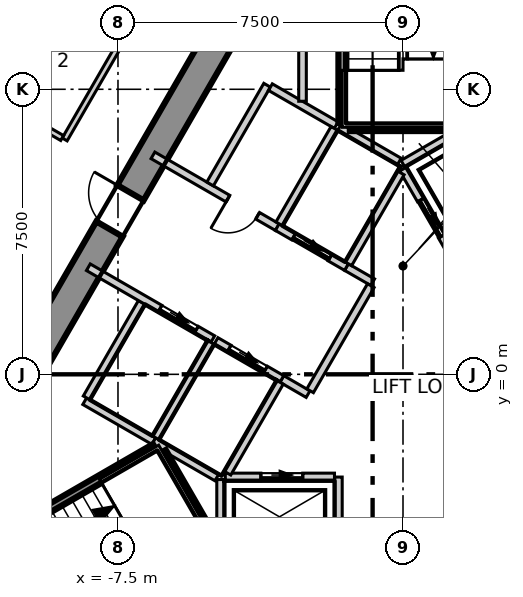
"""IFC4 building model, lengths in metres.
Left out: names, types, materials, properties, quantities, classifications, styles, units other than length and angle.
Written with IfcOpenShell. Run it as: python <this file> out.ifc"""

import sys

from ifc_helpers import new_model, si_unit, direction, frame, frame_2d, origin, place, context, subcontext, project, spatial, polyline, rectangle, outline, extrude, element, fill, save


model = new_model("IFC4")
c1 = context("Model", 3, precision=1e-05, world=origin(), true_north=direction((0.0, 1.0)))
c2 = subcontext(c1, "Body", "Model", "MODEL_VIEW")
j1 = project(units=[si_unit("LENGTHUNIT", "METRE"), si_unit("PLANEANGLEUNIT", "RADIAN")], contexts=[c1])
p1 = place(None, origin())
s1 = spatial("IfcSite", under=j1, at=p1, CompositionType="ELEMENT")
p2 = place(p1, origin())
s2 = spatial("IfcBuilding", under=s1, at=p2, CompositionType="ELEMENT")
p3 = place(p2, frame((0.0, 0.0, 128.3)))
s3 = spatial("IfcBuildingStorey", under=s2, at=p3, CompositionType="ELEMENT", Elevation=128.3)
p4 = place(p3, frame((-1.674, 14.3, -0.3), z_axis=(0.0, 0.0, 1.0), x_axis=(-0.499995765644, -0.866027848477, 0.0)))
e1 = element("IfcWall", 1, at=p4, inside=s3, PredefinedType="SHEAR", context=c2, shape_type="SweptSolid", body=[
    extrude(outline(polyline([(-0.231, -0.4), (1.732, -0.4), (3.695, -0.4), (5.658, -0.4), (7.621, -0.4), (9.584, -0.4), (11.547, -0.4), (13.51, -0.4), (15.473, -0.4), (17.436, -0.4), (19.399, -0.4), (21.362, -0.4), (23.325, -0.4), (22.863, 0.4), (20.977, 0.4), (19.091, 0.4), (17.205, 0.4), (15.319, 0.4), (13.433, 0.4), (11.547, 0.4), (9.661, 0.4), (7.775, 0.4), (5.889, 0.4), (4.003, 0.4), (2.117, 0.4), (0.231, 0.4), (-0.231, -0.4)])), origin(), (0.0, 0.0, 1.0), 4.0),
])
p5 = place(p4, frame((10.997, 0.0, 0.3)))
e2 = element("IfcOpeningElement", 2, at=p5, cuts=e1, PredefinedType="OPENING", context=c2, shape_type="SweptSolid", body=[
    extrude(rectangle(XDim=1.1, YDim=2.1, at=frame_2d((0.55, 1.05))), frame((0.0, 0.41, 0.0), z_axis=(0.0, -1.0, 0.0), x_axis=(1.0, 0.0, 0.0)), (0.0, 0.0, 1.0), 0.82),
])
p6 = place(p4, frame((5.444, 0.0, 0.3)))
e3 = element("IfcOpeningElement", 3, at=p6, cuts=e1, PredefinedType="OPENING", context=c2, shape_type="SweptSolid", body=[
    extrude(rectangle(XDim=0.9, YDim=2.1, at=frame_2d((0.45, 1.05))), frame((0.0, 0.41, 0.0), z_axis=(0.0, -1.0, 0.0), x_axis=(1.0, 0.0, 0.0)), (0.0, 0.0, 1.0), 0.82),
])
p7 = place(p3, frame((-3.109, 34.679, 0.0), z_axis=(0.0, 0.0, 1.0), x_axis=(-0.50000689325, -0.866021423928, 0.0)))
e4 = element("IfcWall", 4, at=p7, inside=s3, PredefinedType="ELEMENTEDWALL", context=c2, shape_type="SweptSolid", body=[
    extrude(rectangle(XDim=56.937, YDim=0.2, at=frame_2d((28.469, 0.0))), origin(), (0.0, 0.0, 1.0), 3.7),
])
p8 = place(p7, frame((2.249, 0.0, 0.9)))
e5 = element("IfcOpeningElement", 5, at=p8, cuts=e4, PredefinedType="OPENING", context=c2, shape_type="SweptSolid", body=[
    extrude(rectangle(XDim=4.9, YDim=2.5, at=frame_2d((2.45, 1.25))), frame((0.0, 0.11, 0.0), z_axis=(0.0, -1.0, 0.0), x_axis=(1.0, 0.0, 0.0)), (0.0, 0.0, 1.0), 0.22),
])
p9 = place(p7, frame((9.043, 0.0, 0.9)))
e6 = element("IfcOpeningElement", 6, at=p9, cuts=e4, PredefinedType="OPENING", context=c2, shape_type="SweptSolid", body=[
    extrude(rectangle(XDim=4.9, YDim=2.5, at=frame_2d((2.45, 1.25))), frame((0.0, 0.11, 0.0), z_axis=(0.0, -1.0, 0.0), x_axis=(1.0, 0.0, 0.0)), (0.0, 0.0, 1.0), 0.22),
])
p10 = place(p7, frame((15.837, 0.0, 0.9)))
e7 = element("IfcOpeningElement", 7, at=p10, cuts=e4, PredefinedType="OPENING", context=c2, shape_type="SweptSolid", body=[
    extrude(rectangle(XDim=4.9, YDim=2.5, at=frame_2d((2.45, 1.25))), frame((0.0, 0.11, 0.0), z_axis=(0.0, -1.0, 0.0), x_axis=(1.0, 0.0, 0.0)), (0.0, 0.0, 1.0), 0.22),
])
p11 = place(p7, frame((22.631, 0.0, 0.9)))
e8 = element("IfcOpeningElement", 8, at=p11, cuts=e4, PredefinedType="OPENING", context=c2, shape_type="SweptSolid", body=[
    extrude(rectangle(XDim=4.9, YDim=2.5, at=frame_2d((2.45, 1.25))), frame((0.0, 0.11, 0.0), z_axis=(0.0, -1.0, 0.0), x_axis=(1.0, 0.0, 0.0)), (0.0, 0.0, 1.0), 0.22),
])
p12 = place(p7, frame((29.425, 0.0, 0.9)))
e9 = element("IfcOpeningElement", 9, at=p12, cuts=e4, PredefinedType="OPENING", context=c2, shape_type="SweptSolid", body=[
    extrude(rectangle(XDim=4.9, YDim=2.5, at=frame_2d((2.45, 1.25))), frame((0.0, 0.11, 0.0), z_axis=(0.0, -1.0, 0.0), x_axis=(1.0, 0.0, 0.0)), (0.0, 0.0, 1.0), 0.22),
])
p13 = place(p7, frame((36.219, 0.0, 0.9)))
e10 = element("IfcOpeningElement", 10, at=p13, cuts=e4, PredefinedType="OPENING", context=c2, shape_type="SweptSolid", body=[
    extrude(rectangle(XDim=4.9, YDim=2.5, at=frame_2d((2.45, 1.25))), frame((0.0, 0.11, 0.0), z_axis=(0.0, -1.0, 0.0), x_axis=(1.0, 0.0, 0.0)), (0.0, 0.0, 1.0), 0.22),
])
p14 = place(p7, frame((43.013, 0.0, 0.9)))
e11 = element("IfcOpeningElement", 11, at=p14, cuts=e4, PredefinedType="OPENING", context=c2, shape_type="SweptSolid", body=[
    extrude(rectangle(XDim=4.9, YDim=2.5, at=frame_2d((2.45, 1.25))), frame((0.0, 0.11, 0.0), z_axis=(0.0, -1.0, 0.0), x_axis=(1.0, 0.0, 0.0)), (0.0, 0.0, 1.0), 0.22),
])
p15 = place(p7, frame((49.807, 0.0, 0.9)))
e12 = element("IfcOpeningElement", 12, at=p15, cuts=e4, PredefinedType="OPENING", context=c2, shape_type="SweptSolid", body=[
    extrude(rectangle(XDim=4.9, YDim=2.5, at=frame_2d((2.45, 1.25))), frame((0.0, 0.11, 0.0), z_axis=(0.0, -1.0, 0.0), x_axis=(1.0, 0.0, 0.0)), (0.0, 0.0, 1.0), 0.22),
])
p16 = place(p3, frame((-8.903, 6.18, 0.0), z_axis=(0.0, 0.0, 1.0), x_axis=(0.500010074151, 0.866019587393, 0.0)))
e13 = element("IfcWall", 13, at=p16, inside=s3, PredefinedType="PARTITIONING", context=c2, shape_type="SweptSolid", body=[
    extrude(rectangle(XDim=17.806, YDim=0.15, at=frame_2d((8.903, 0.0))), origin(), (0.0, 0.0, 1.0), 3.7),
])
p17 = place(p16, frame((14.756, 0.0, 0.0)))
e14 = element("IfcOpeningElement", 14, at=p17, cuts=e13, PredefinedType="OPENING", context=c2, shape_type="SweptSolid", body=[
    extrude(rectangle(XDim=1.0, YDim=2.1, at=frame_2d((0.5, 1.05))), frame((0.0, 0.085, 0.0), z_axis=(0.0, -1.0, 0.0), x_axis=(1.0, 0.0, 0.0)), (0.0, 0.0, 1.0), 0.17),
])
p18 = place(p16, frame((2.838, 0.0, 0.0)))
e15 = element("IfcOpeningElement", 15, at=p18, cuts=e13, PredefinedType="OPENING", context=c2, shape_type="SweptSolid", body=[
    extrude(rectangle(XDim=1.1, YDim=2.1, at=frame_2d((0.55, 1.05))), frame((0.0, 0.085, 0.0), z_axis=(0.0, -1.0, 0.0), x_axis=(1.0, 0.0, 0.0)), (0.0, 0.0, 1.0), 0.17),
])
p19 = place(p16, frame((10.438, 0.0, 0.0)))
e16 = element("IfcOpeningElement", 16, at=p19, cuts=e13, PredefinedType="OPENING", context=c2, shape_type="SweptSolid", body=[
    extrude(rectangle(XDim=0.9, YDim=2.1, at=frame_2d((0.45, 1.05))), frame((0.0, 0.085, 0.0), z_axis=(0.0, -1.0, 0.0), x_axis=(1.0, 0.0, 0.0)), (0.0, 0.0, 1.0), 0.17),
])
p20 = place(p16, frame((7.438, 0.0, 0.0)))
e17 = element("IfcOpeningElement", 17, at=p20, cuts=e13, PredefinedType="OPENING", context=c2, shape_type="SweptSolid", body=[
    extrude(rectangle(XDim=0.9, YDim=2.1, at=frame_2d((0.45, 1.05))), frame((0.0, 0.085, 0.0), z_axis=(0.0, -1.0, 0.0), x_axis=(1.0, 0.0, 0.0)), (0.0, 0.0, 1.0), 0.17),
])
p21 = place(p3, frame((-12.475, 8.242, 0.0), z_axis=(0.0, 0.0, 1.0), x_axis=(0.865955608197, -0.500120870022, 0.0)))
e18 = element("IfcWall", 18, at=p21, inside=s3, PredefinedType="PARTITIONING", context=c2, shape_type="SweptSolid", body=[
    extrude(rectangle(XDim=4.049, YDim=0.15, at=frame_2d((2.024, 0.0))), origin(), (0.0, 0.0, 1.0), 3.7),
])
p22 = place(p3, frame((0.076, 21.468, 0.0), z_axis=(0.0, 0.0, 1.0), x_axis=(0.50001203818, -0.866018453426, 0.0)))
e19 = element("IfcWall", 19, at=p22, inside=s3, PredefinedType="PARTITIONING", context=c2, shape_type="SweptSolid", body=[
    extrude(rectangle(XDim=24.448, YDim=0.15, at=frame_2d((12.224, 0.0))), origin(), (0.0, 0.0, 1.0), 3.7),
])
p23 = place(p22, frame((9.798, 0.0, 0.0)))
e20 = element("IfcOpeningElement", 20, at=p23, cuts=e19, PredefinedType="OPENING", context=c2, shape_type="SweptSolid", body=[
    extrude(rectangle(XDim=1.1, YDim=2.1, at=frame_2d((0.55, 1.05))), frame((0.0, 0.085, 0.0), z_axis=(0.0, -1.0, 0.0), x_axis=(1.0, 0.0, 0.0)), (0.0, 0.0, 1.0), 0.17),
])
p24 = place(p22, frame((19.198, 0.0, 0.0)))
e21 = element("IfcOpeningElement", 21, at=p24, cuts=e19, PredefinedType="OPENING", context=c2, shape_type="SweptSolid", body=[
    extrude(rectangle(XDim=0.9, YDim=2.1, at=frame_2d((0.45, 1.05))), frame((0.0, 0.085, 0.0), z_axis=(0.0, -1.0, 0.0), x_axis=(1.0, 0.0, 0.0)), (0.0, 0.0, 1.0), 0.17),
])
p25 = place(p22, frame((16.398, 0.0, 0.0)))
e22 = element("IfcOpeningElement", 22, at=p25, cuts=e19, PredefinedType="OPENING", context=c2, shape_type="SweptSolid", body=[
    extrude(rectangle(XDim=1.0, YDim=2.1, at=frame_2d((0.5, 1.05))), frame((0.0, 0.085, 0.0), z_axis=(0.0, -1.0, 0.0), x_axis=(1.0, 0.0, 0.0)), (0.0, 0.0, 1.0), 0.17),
])
p26 = place(p22, frame((1.815, 0.0, 0.0)))
e23 = element("IfcOpeningElement", 23, at=p26, cuts=e19, PredefinedType="OPENING", context=c2, shape_type="SweptSolid", body=[
    extrude(rectangle(XDim=1.1, YDim=2.1, at=frame_2d((0.55, 1.05))), frame((0.0, 0.085, 0.0), z_axis=(0.0, -1.0, 0.0), x_axis=(1.0, 0.0, 0.0)), (0.0, 0.0, 1.0), 0.17),
])
p27 = place(p3, frame((-8.376, -0.707, 0.0), z_axis=(0.0, 0.0, 1.0), x_axis=(0.866067520717, -0.499927044236, 0.0)))
e24 = element("IfcWall", 24, at=p27, inside=s3, PredefinedType="SOLIDWALL", context=c2, shape_type="SweptSolid", body=[
    extrude(rectangle(XDim=2.1, YDim=0.2, at=frame_2d((1.05, 0.0))), origin(), (0.0, 0.0, 1.0), 3.7),
])
p28 = place(p3, frame((-8.326, -0.62, 0.0), z_axis=(0.0, 0.0, 1.0), x_axis=(0.500023687443, 0.866011727401, 0.0)))
e25 = element("IfcWall", 25, at=p28, inside=s3, PredefinedType="SOLIDWALL", context=c2, shape_type="SweptSolid", body=[
    extrude(rectangle(XDim=2.9, YDim=0.2, at=frame_2d((1.45, 0.0))), origin(), (0.0, 0.0, 1.0), 3.7),
])
p29 = place(p3, frame((-4.8, -6.9, 0.0), z_axis=(0.0, 0.0, 1.0), x_axis=(0.0, 1.0, 0.0)))
e26 = element("IfcWall", 26, at=p29, inside=s3, PredefinedType="SOLIDWALL", context=c2, shape_type="SweptSolid", body=[
    extrude(rectangle(XDim=4.131, YDim=0.2, at=frame_2d((2.065, 0.0))), origin(), (0.0, 0.0, 1.0), 3.7),
])
p30 = place(p3, frame((-1.7, -8.58, 0.0), z_axis=(0.0, 0.0, 1.0), x_axis=(0.0, 1.0, 0.0)))
e27 = element("IfcWall", 27, at=p30, inside=s3, PredefinedType="SOLIDWALL", context=c2, shape_type="SweptSolid", body=[
    extrude(rectangle(XDim=5.877, YDim=0.2, at=frame_2d((2.938, 0.0))), origin(), (0.0, 0.0, 1.0), 3.7),
])
p31 = place(p30, frame((2.18, 0.0, 0.0)))
e28 = element("IfcOpeningElement", 28, at=p31, cuts=e27, PredefinedType="OPENING", context=c2, shape_type="SweptSolid", body=[
    extrude(rectangle(XDim=1.1, YDim=2.1, at=frame_2d((0.55, 1.05))), frame((0.0, 0.11, 0.0), z_axis=(0.0, -1.0, 0.0), x_axis=(1.0, 0.0, 0.0)), (0.0, 0.0, 1.0), 0.22),
])
p32 = place(p3, frame((-4.676, -2.7, 0.0), z_axis=(0.0, 0.0, 1.0), x_axis=(1.0, 0.0, 0.0)))
e29 = element("IfcWall", 29, at=p32, inside=s3, PredefinedType="SOLIDWALL", context=c2, shape_type="SweptSolid", body=[
    extrude(rectangle(XDim=2.873, YDim=0.2, at=frame_2d((1.437, 0.0))), origin(), (0.0, 0.0, 1.0), 3.7),
])
p33 = place(p32, frame((0.937, 0.0, 0.0)))
e30 = element("IfcOpeningElement", 30, at=p33, cuts=e29, PredefinedType="OPENING", context=c2, shape_type="SweptSolid", body=[
    extrude(rectangle(XDim=1.1, YDim=2.1, at=frame_2d((0.55, 1.05))), frame((0.0, 0.11, 0.0), z_axis=(0.0, -1.0, 0.0), x_axis=(1.0, 0.0, 0.0)), (0.0, 0.0, 1.0), 0.22),
])
p34 = place(p3, frame((-0.002, 5.542, 0.0), z_axis=(0.0, 0.0, 1.0), x_axis=(0.866103910842, 0.499863997127, 0.0)))
e31 = element("IfcWall", 31, at=p34, inside=s3, PredefinedType="SOLIDWALL", context=c2, shape_type="SweptSolid", body=[
    extrude(rectangle(XDim=4.131, YDim=0.2, at=frame_2d((2.065, 0.0))), origin(), (0.0, 0.0, 1.0), 3.7),
])
p35 = place(p3, frame((0.0, 5.4, 0.0), z_axis=(0.0, 0.0, 1.0), x_axis=(0.500103862429, -0.865965430478, 0.0)))
e32 = element("IfcWall", 32, at=p35, inside=s3, PredefinedType="SOLIDWALL", context=c2, shape_type="SweptSolid", body=[
    extrude(rectangle(XDim=2.973, YDim=0.2, at=frame_2d((1.487, 0.0))), origin(), (0.0, 0.0, 1.0), 3.7),
])
p36 = place(p35, frame((0.937, 0.0, 0.0)))
e33 = element("IfcOpeningElement", 33, at=p36, cuts=e32, PredefinedType="OPENING", context=c2, shape_type="SweptSolid", body=[
    extrude(rectangle(XDim=1.1, YDim=2.1, at=frame_2d((0.55, 1.05))), frame((0.0, 0.11, 0.0), z_axis=(0.0, -1.0, 0.0), x_axis=(1.0, 0.0, 0.0)), (0.0, 0.0, 1.0), 0.22),
])
p37 = place(p3, frame((-8.28, 2.818, 0.0), z_axis=(0.0, 0.0, 1.0), x_axis=(0.86600175068, -0.50004096614, 0.0)))
e34 = element("IfcWall", 34, at=p37, inside=s3, PredefinedType="SOLIDWALL", context=c2, shape_type="SweptSolid", body=[
    extrude(rectangle(XDim=3.782, YDim=0.2, at=frame_2d((1.891, 0.0))), origin(), (0.0, 0.0, 1.0), 3.7),
])
p38 = place(p37, frame((2.18, 0.0, 0.0)))
e35 = element("IfcOpeningElement", 35, at=p38, cuts=e34, PredefinedType="OPENING", context=c2, shape_type="SweptSolid", body=[
    extrude(rectangle(XDim=1.1, YDim=2.1, at=frame_2d((0.55, 1.05))), frame((0.0, 0.11, 0.0), z_axis=(0.0, -1.0, 0.0), x_axis=(1.0, 0.0, 0.0)), (0.0, 0.0, 1.0), 0.22),
])
p39 = place(p3, frame((-3.188, -0.122, 0.0), z_axis=(0.0, 0.0, 1.0), x_axis=(0.865705793592, -0.50055317294, 0.0)))
e36 = element("IfcWall", 36, at=p39, inside=s3, PredefinedType="SOLIDWALL", context=c2, shape_type="SweptSolid", body=[
    extrude(rectangle(XDim=0.797, YDim=0.2, at=frame_2d((0.398, 0.0))), origin(), (0.0, 0.0, 1.0), 3.7),
])
p40 = place(p3, frame((-6.58, 5.762, 0.0), z_axis=(0.0, 0.0, 1.0), x_axis=(0.866029704776, -0.49999255039, 0.0)))
e37 = element("IfcWall", 37, at=p40, inside=s3, PredefinedType="SOLIDWALL", context=c2, shape_type="SweptSolid", body=[
    extrude(rectangle(XDim=3.782, YDim=0.2, at=frame_2d((1.891, 0.0))), origin(), (0.0, 0.0, 1.0), 3.7),
])
p41 = place(p40, frame((2.279, 0.0, 0.0)))
e38 = element("IfcOpeningElement", 38, at=p41, cuts=e37, PredefinedType="OPENING", context=c2, shape_type="SweptSolid", body=[
    extrude(rectangle(XDim=0.9, YDim=2.1, at=frame_2d((0.45, 1.05))), frame((0.0, 0.11, 0.0), z_axis=(0.0, -1.0, 0.0), x_axis=(1.0, 0.0, 0.0)), (0.0, 0.0, 1.0), 0.22),
])
p42 = place(p3, frame((-1.488, 2.822, 0.0), z_axis=(0.0, 0.0, 1.0), x_axis=(0.866236612152, -0.499633997809, 0.0)))
e39 = element("IfcWall", 39, at=p42, inside=s3, PredefinedType="SOLIDWALL", context=c2, shape_type="SweptSolid", body=[
    extrude(rectangle(XDim=0.796, YDim=0.2, at=frame_2d((0.398, 0.0))), origin(), (0.0, 0.0, 1.0), 3.7),
])
p43 = place(p3, frame((-5.076, 5.009, 0.0), z_axis=(0.0, 0.0, 1.0), x_axis=(0.50002537861, 0.866010750942, 0.0)))
e40 = element("IfcWall", 40, at=p43, inside=s3, PredefinedType="SOLIDWALL", context=c2, shape_type="SweptSolid", body=[
    extrude(rectangle(XDim=3.0, YDim=0.2, at=frame_2d((1.5, 0.0))), origin(), (0.0, 0.0, 1.0), 3.7),
])
p44 = place(p3, frame((-3.489, 7.557, 0.0), z_axis=(0.0, 0.0, 1.0), x_axis=(0.866010750942, -0.50002537861, 0.0)))
e41 = element("IfcWall", 41, at=p44, inside=s3, PredefinedType="SOLIDWALL", context=c2, shape_type="SweptSolid", body=[
    extrude(rectangle(XDim=2.0, YDim=0.2, at=frame_2d((1.0, 0.0))), origin(), (0.0, 0.0, 1.0), 3.7),
])
p45 = place(p3, frame((-2.444, -0.433, 0.0), z_axis=(0.0, 0.0, 1.0), x_axis=(0.500035624827, 0.866004834804, 0.0)))
e42 = element("IfcWall", 42, at=p45, inside=s3, PredefinedType="SOLIDWALL", context=c2, shape_type="SweptSolid", body=[
    extrude(rectangle(XDim=3.194, YDim=0.2, at=frame_2d((1.597, 0.0))), origin(), (0.0, 0.0, 1.0), 3.7),
])
p46 = place(p3, frame((-6.557, -1.757, 0.0), z_axis=(0.0, 0.0, 1.0), x_axis=(0.8659754619, -0.500086491905, 0.0)))
e43 = element("IfcWall", 43, at=p46, inside=s3, PredefinedType="SOLIDWALL", context=c2, shape_type="SweptSolid", body=[
    extrude(rectangle(XDim=1.916, YDim=0.2, at=frame_2d((0.958, 0.0))), origin(), (0.0, 0.0, 1.0), 3.7),
])
p47 = place(p3, frame((-6.507, -1.67, 0.0), z_axis=(0.0, 0.0, 1.0), x_axis=(0.50012328804, 0.865954211699, 0.0)))
e44 = element("IfcWall", 44, at=p47, inside=s3, PredefinedType="SOLIDWALL", context=c2, shape_type="SweptSolid", body=[
    extrude(rectangle(XDim=2.9, YDim=0.2, at=frame_2d((1.45, 0.0))), origin(), (0.0, 0.0, 1.0), 3.7),
])
p48 = place(p3, frame((-4.92, 0.878, 0.0), z_axis=(0.0, 0.0, 1.0), x_axis=(0.866010750942, -0.50002537861, 0.0)))
e45 = element("IfcWall", 45, at=p48, inside=s3, PredefinedType="SOLIDWALL", context=c2, shape_type="SweptSolid", body=[
    extrude(rectangle(XDim=2.0, YDim=0.2, at=frame_2d((1.0, 0.0))), origin(), (0.0, 0.0, 1.0), 3.7),
])
p49 = place(p48, frame((0.4, 0.0, 0.0)))
e46 = element("IfcOpeningElement", 46, at=p49, cuts=e45, PredefinedType="OPENING", context=c2, shape_type="SweptSolid", body=[
    extrude(rectangle(XDim=1.1, YDim=2.1, at=frame_2d((0.55, 1.05))), frame((0.0, 0.11, 0.0), z_axis=(0.0, -1.0, 0.0), x_axis=(1.0, 0.0, 0.0)), (0.0, 0.0, 1.0), 0.22),
])
p50 = place(p3, frame((-4.619, -2.6, 0.0), z_axis=(0.0, 0.0, 1.0), x_axis=(0.50009492287, 0.865970593103, 0.0)))
e47 = element("IfcWall", 47, at=p50, inside=s3, PredefinedType="SOLIDWALL", context=c2, shape_type="SweptSolid", body=[
    extrude(rectangle(XDim=2.761, YDim=0.2, at=frame_2d((1.381, 0.0))), origin(), (0.0, 0.0, 1.0), 3.7),
])
p51 = place(p3, frame((-3.309, 3.873, 0.0), z_axis=(0.0, 0.0, 1.0), x_axis=(0.866098583652, -0.499873227325, 0.0)))
e48 = element("IfcWall", 48, at=p51, inside=s3, PredefinedType="SOLIDWALL", context=c2, shape_type="SweptSolid", body=[
    extrude(rectangle(XDim=2.103, YDim=0.2, at=frame_2d((1.051, 0.0))), origin(), (0.0, 0.0, 1.0), 3.7),
])
p52 = place(p51, frame((0.502, 0.0, 0.0)))
e49 = element("IfcOpeningElement", 49, at=p52, cuts=e48, PredefinedType="OPENING", context=c2, shape_type="SweptSolid", body=[
    extrude(rectangle(XDim=1.1, YDim=2.1, at=frame_2d((0.55, 1.05))), frame((0.0, 0.11, 0.0), z_axis=(0.0, -1.0, 0.0), x_axis=(1.0, 0.0, 0.0)), (0.0, 0.0, 1.0), 0.22),
])
p53 = place(p3, frame((-3.257, 3.959, 0.0), z_axis=(0.0, 0.0, 1.0), x_axis=(0.50012328804, 0.865954211699, 0.0)))
e50 = element("IfcWall", 50, at=p53, inside=s3, PredefinedType="SOLIDWALL", context=c2, shape_type="SweptSolid", body=[
    extrude(rectangle(XDim=2.9, YDim=0.2, at=frame_2d((1.45, 0.0))), origin(), (0.0, 0.0, 1.0), 3.7),
])
p54 = place(p3, frame((-1.67, 6.507, 0.0), z_axis=(0.0, 0.0, 1.0), x_axis=(0.865941441609, -0.500145398563, 0.0)))
e51 = element("IfcWall", 51, at=p54, inside=s3, PredefinedType="SOLIDWALL", context=c2, shape_type="SweptSolid", body=[
    extrude(rectangle(XDim=1.815, YDim=0.2, at=frame_2d((0.908, 0.0))), origin(), (0.0, 0.0, 1.0), 3.7),
])
p55 = place(p3, frame((-1.438, 2.909, 0.0), z_axis=(0.0, 0.0, 1.0), x_axis=(0.499829630636, 0.866123744241, 0.0)))
e52 = element("IfcWall", 52, at=p55, inside=s3, PredefinedType="SOLIDWALL", context=c2, shape_type="SweptSolid", body=[
    extrude(rectangle(XDim=2.761, YDim=0.2, at=frame_2d((1.38, 0.0))), origin(), (0.0, 0.0, 1.0), 3.7),
])
p56 = place(p3, frame((-2.644, 7.185, 0.0), z_axis=(0.0, 0.0, 1.0), x_axis=(0.0, 1.0, 0.0)))
e53 = element("IfcWall", 53, at=p56, inside=s3, PredefinedType="SOLIDWALL", context=c2, shape_type="SweptSolid", body=[
    extrude(rectangle(XDim=5.395, YDim=0.2, at=frame_2d((2.698, 0.0))), origin(), (0.0, 0.0, 1.0), 3.7),
])
p57 = place(p3, frame((-13.167, -5.754, 0.0), z_axis=(0.0, 0.0, 1.0), x_axis=(0.866060938598, 0.499938446846, 0.0)))
e54 = element("IfcWall", 54, at=p57, inside=s3, PredefinedType="SOLIDWALL", context=c2, shape_type="SweptSolid", body=[
    extrude(rectangle(XDim=7.665, YDim=0.2, at=frame_2d((3.832, 0.0))), origin(), (0.0, 0.0, 1.0), 3.7),
])
p58 = place(p3, frame((-6.329, -2.038, 0.0), z_axis=(0.0, 0.0, 1.0), x_axis=(0.500200581029, -0.865909567298, 0.0)))
e55 = element("IfcWall", 55, at=p58, inside=s3, PredefinedType="SOLIDWALL", context=c2, shape_type="SweptSolid", body=[
    extrude(rectangle(XDim=2.799, YDim=0.2, at=frame_2d((1.399, 0.0))), origin(), (0.0, 0.0, 1.0), 3.7),
])
p59 = place(p3, frame((-1.4, 6.5, 0.0), z_axis=(0.0, 0.0, 1.0), x_axis=(1.0, 0.0, 0.0)))
e56 = element("IfcWall", 56, at=p59, inside=s3, PredefinedType="SOLIDWALL", context=c2, shape_type="SweptSolid", body=[
    extrude(rectangle(XDim=2.8, YDim=0.2, at=frame_2d((1.4, 0.0))), origin(), (0.0, 0.0, 1.0), 3.7),
])
p60 = place(p3, frame((-1.6, 6.615, 0.0), z_axis=(0.0, 0.0, 1.0), x_axis=(0.0, 1.0, 0.0)))
e57 = element("IfcWall", 57, at=p60, inside=s3, PredefinedType="SOLIDWALL", context=c2, shape_type="SweptSolid", body=[
    extrude(rectangle(XDim=7.665, YDim=0.2, at=frame_2d((3.833, 0.0))), origin(), (0.0, 0.0, 1.0), 3.7),
])
p61 = place(p33, origin())
e58 = element("IfcDoor", 58, at=p61, inside=s3, OperationType="SLIDING_TO_LEFT", PredefinedType="DOOR", context=c2, shape_type="SweptSolid", body=[
    extrude(rectangle(XDim=1.1, YDim=2.1, at=frame_2d((0.55, 1.05))), frame((0.0, 0.025, 0.0), z_axis=(0.0, -1.0, 0.0), x_axis=(1.0, 0.0, 0.0)), (0.0, 0.0, 1.0), 0.05),
])
fill(e30, e58)
p62 = place(p36, origin())
e59 = element("IfcDoor", 59, at=p62, inside=s3, OperationType="SLIDING_TO_LEFT", PredefinedType="DOOR", context=c2, shape_type="SweptSolid", body=[
    extrude(rectangle(XDim=1.1, YDim=2.1, at=frame_2d((0.55, 1.05))), frame((0.0, 0.025, 0.0), z_axis=(0.0, -1.0, 0.0), x_axis=(1.0, 0.0, 0.0)), (0.0, 0.0, 1.0), 0.05),
])
fill(e33, e59)
p63 = place(p49, origin())
e60 = element("IfcDoor", 60, at=p63, inside=s3, OperationType="SLIDING_TO_LEFT", PredefinedType="DOOR", context=c2, shape_type="SweptSolid", body=[
    extrude(rectangle(XDim=1.1, YDim=2.1, at=frame_2d((0.55, 1.05))), frame((0.0, 0.025, 0.0), z_axis=(0.0, -1.0, 0.0), x_axis=(1.0, 0.0, 0.0)), (0.0, 0.0, 1.0), 0.05),
])
fill(e46, e60)
p64 = place(p52, origin())
e61 = element("IfcDoor", 61, at=p64, inside=s3, OperationType="SLIDING_TO_LEFT", PredefinedType="DOOR", context=c2, shape_type="SweptSolid", body=[
    extrude(rectangle(XDim=1.1, YDim=2.1, at=frame_2d((0.55, 1.05))), frame((0.0, 0.025, 0.0), z_axis=(0.0, -1.0, 0.0), x_axis=(1.0, 0.0, 0.0)), (0.0, 0.0, 1.0), 0.05),
])
fill(e49, e61)
p65 = place(p38, origin())
e62 = element("IfcDoor", 62, at=p65, inside=s3, OperationType="SLIDING_TO_LEFT", PredefinedType="DOOR", context=c2, shape_type="SweptSolid", body=[
    extrude(rectangle(XDim=1.1, YDim=2.1, at=frame_2d((0.55, 1.05))), frame((0.0, 0.025, 0.0), z_axis=(0.0, -1.0, 0.0), x_axis=(1.0, 0.0, 0.0)), (0.0, 0.0, 1.0), 0.05),
])
fill(e35, e62)
p66 = place(p41, origin())
e63 = element("IfcDoor", 63, at=p66, inside=s3, OperationType="SINGLE_SWING_LEFT", PredefinedType="DOOR", context=c2, shape_type="SweptSolid", body=[
    extrude(rectangle(XDim=0.9, YDim=2.1, at=frame_2d((0.45, 1.05))), frame((0.0, 0.025, 0.0), z_axis=(0.0, -1.0, 0.0), x_axis=(1.0, 0.0, 0.0)), (0.0, 0.0, 1.0), 0.05),
])
fill(e38, e63)
p67 = place(p5, origin())
e64 = element("IfcDoor", 64, at=p67, inside=s3, OperationType="SINGLE_SWING_LEFT", PredefinedType="DOOR", context=c2, shape_type="SweptSolid", body=[
    extrude(rectangle(XDim=1.1, YDim=2.1, at=frame_2d((0.55, 1.05))), frame((0.0, 0.025, 0.0), z_axis=(0.0, -1.0, 0.0), x_axis=(1.0, 0.0, 0.0)), (0.0, 0.0, 1.0), 0.05),
])
fill(e2, e64)
save(model, sys.argv[1])
